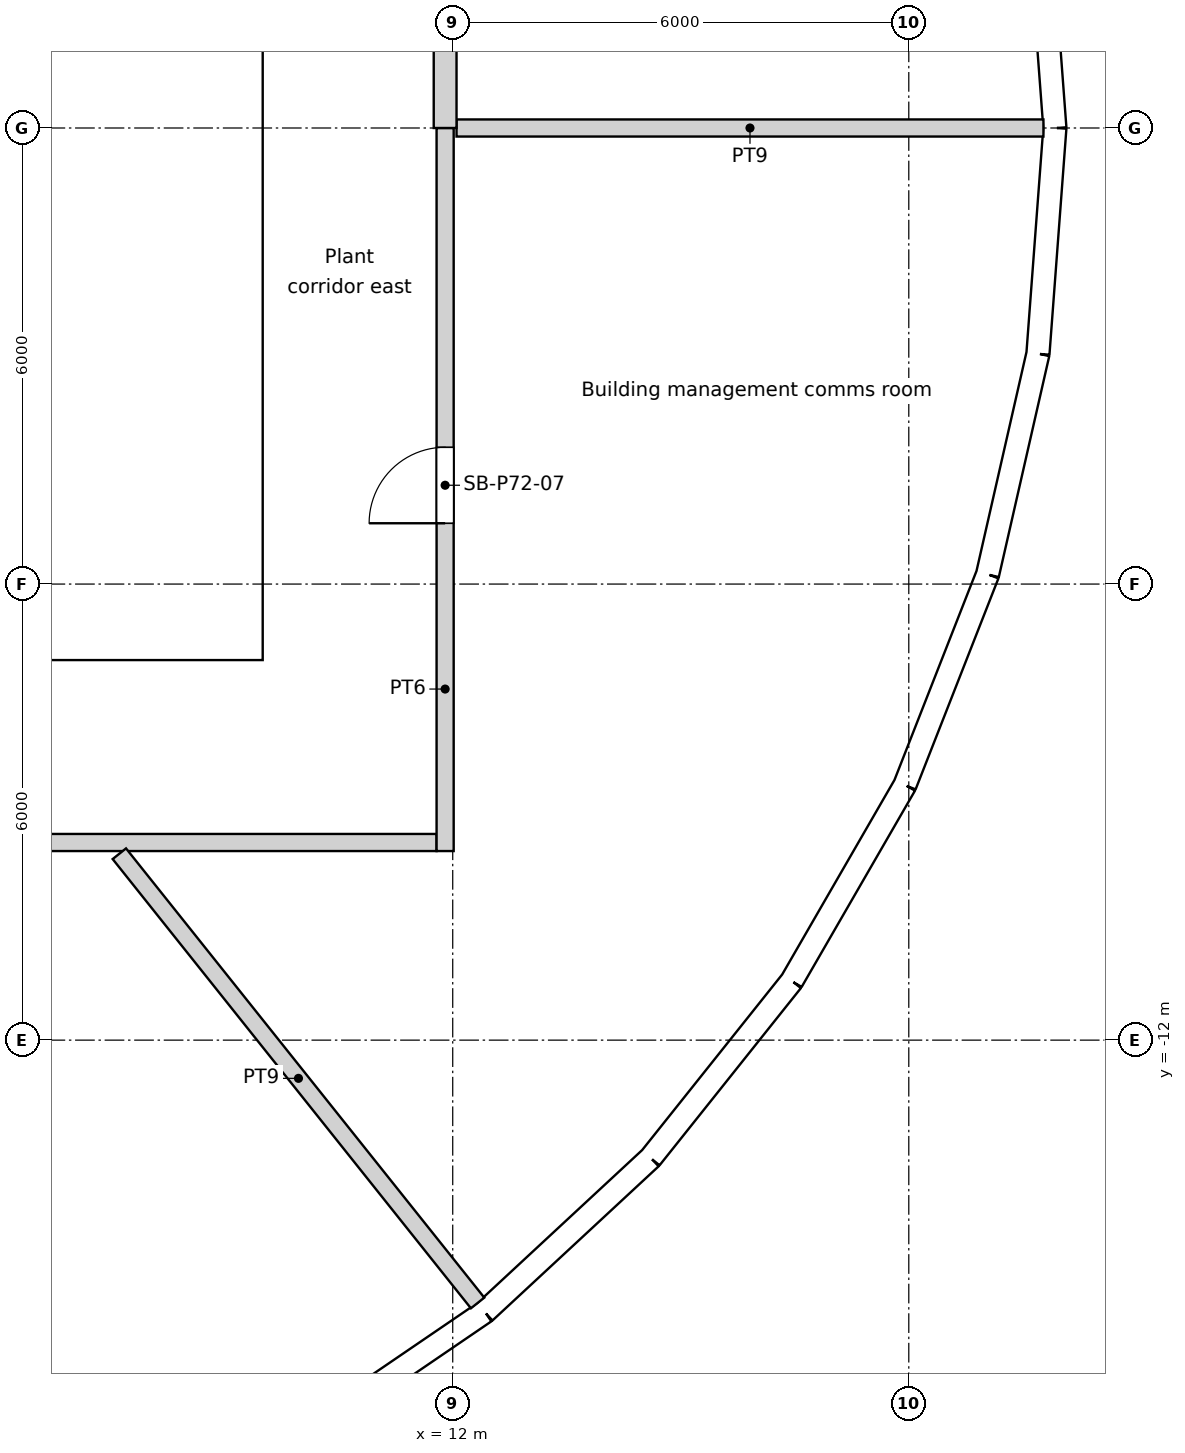
"""IFC4 building model, lengths in metres.
Left out: names, types, materials, properties, quantities, classifications, styles, units other than length and angle.
Written with IfcOpenShell. Run it as: python <this file> out.ifc"""

import sys

from ifc_helpers import new_model, si_unit, direction, frame, frame_2d, origin, origin_2d, place, context, subcontext, project, spatial, rectangle, circle, extrude, element, fill, save


model = new_model("IFC4")
c1 = context("Model", 3, precision=1e-05, world=origin(), true_north=direction((0.0, 1.0)))
c2 = subcontext(c1, "Body", "Model", "MODEL_VIEW")
j1 = project(units=[si_unit("LENGTHUNIT", "METRE"), si_unit("PLANEANGLEUNIT", "RADIAN")], contexts=[c1])
p1 = place(None, origin())
s1 = spatial("IfcSite", under=j1, at=p1, CompositionType="ELEMENT")
p2 = place(p1, origin())
s2 = spatial("IfcBuilding", under=s1, at=p2, CompositionType="ELEMENT")
p3 = place(p2, frame((0.0, 0.0, 277.8)))
s3 = spatial("IfcBuildingStorey", under=s2, at=p3, CompositionType="ELEMENT", Elevation=277.8)
for number, where, z_axis, x_axis in (
    (1, (18.822, 0.0, 0.0), (0.0, 0.0, 1.0), (1.0, 0.0, 0.0)),
    (2, (11.735, -14.716, 0.0), (0.0, 0.0, 1.0), (1.0, 0.0, 0.0)),
    (3, (15.552, -10.603, 0.0), (0.0, 0.0, 1.0), (1.0, 0.0, 0.0)),
    (4, (17.986, -5.548, 0.0), (0.0, 0.0, 1.0), (1.0, 0.0, 0.0)),
):
    element("IfcColumn", number, at=place(p3, frame(where, z_axis=z_axis, x_axis=x_axis)), inside=s3, PredefinedType="COLUMN", context=c2, shape_type="SweptSolid", body=[
        extrude(circle(Radius=0.55, at=origin_2d()), origin(), (0.0, 0.0, 1.0), 6.0),
    ])
p4 = place(p3, frame((19.922, 0.0, 0.0), z_axis=(0.0, 0.0, 1.0), x_axis=(-0.074777718064, 0.997200227076, 0.0)))
e5 = element("IfcWall", 5, at=p4, inside=s3, PredefinedType="SOLIDWALL", context=c2, shape_type="SweptSolid", body=[
    extrude(rectangle(XDim=2.978, YDim=0.3, at=frame_2d((1.489, 0.0))), origin(), (0.0, 0.0, 1.0), 5.65),
])
p5 = place(p4, frame((1.489, 0.0, 1.825)))
e6 = element("IfcOpeningElement", 6, at=p5, cuts=e5, PredefinedType="OPENING", context=c2, shape_type="SweptSolid", body=[
    extrude(circle(Radius=1.2, at=origin_2d()), frame((0.0, 0.16, 0.0), z_axis=(0.0, -1.0, 0.0), x_axis=(1.0, 0.0, 0.0)), (0.0, 0.0, 1.0), 0.32),
])
p6 = place(p3, frame((9.961, -17.253, 0.0), z_axis=(0.0, 0.0, 1.0), x_axis=(0.826253362584, 0.56329866041, 0.0)))
e7 = element("IfcWall", 7, at=p6, inside=s3, PredefinedType="SOLIDWALL", context=c2, shape_type="SweptSolid", body=[
    extrude(rectangle(XDim=2.978, YDim=0.3, at=frame_2d((1.489, 0.0))), origin(), (0.0, 0.0, 1.0), 5.65),
])
p7 = place(p6, frame((1.489, 0.0, 1.825)))
e8 = element("IfcOpeningElement", 8, at=p7, cuts=e7, PredefinedType="OPENING", context=c2, shape_type="SweptSolid", body=[
    extrude(circle(Radius=1.2, at=origin_2d()), frame((0.0, 0.16, 0.0), z_axis=(0.0, -1.0, 0.0), x_axis=(1.0, 0.0, 0.0)), (0.0, 0.0, 1.0), 0.32),
])
p8 = place(p3, frame((12.421, -15.575, 0.0), z_axis=(0.0, 0.0, 1.0), x_axis=(0.733056277766, 0.68016798927, 0.0)))
e9 = element("IfcWall", 9, at=p8, inside=s3, PredefinedType="SOLIDWALL", context=c2, shape_type="SweptSolid", body=[
    extrude(rectangle(XDim=2.978, YDim=0.3, at=frame_2d((1.489, 0.0))), origin(), (0.0, 0.0, 1.0), 5.65),
])
p9 = place(p8, frame((1.489, 0.0, 1.825)))
e10 = element("IfcOpeningElement", 10, at=p9, cuts=e9, PredefinedType="OPENING", context=c2, shape_type="SweptSolid", body=[
    extrude(circle(Radius=1.2, at=origin_2d()), frame((0.0, 0.16, 0.0), z_axis=(0.0, -1.0, 0.0), x_axis=(1.0, 0.0, 0.0)), (0.0, 0.0, 1.0), 0.32),
])
p10 = place(p3, frame((14.604, -13.55, 0.0), z_axis=(0.0, 0.0, 1.0), x_axis=(0.623494374707, 0.781827835722, 0.0)))
e11 = element("IfcWall", 11, at=p10, inside=s3, PredefinedType="SOLIDWALL", context=c2, shape_type="SweptSolid", body=[
    extrude(rectangle(XDim=2.978, YDim=0.3, at=frame_2d((1.489, 0.0))), origin(), (0.0, 0.0, 1.0), 5.2),
])
p11 = place(p10, frame((1.489, 0.0, 1.825)))
e12 = element("IfcOpeningElement", 12, at=p11, cuts=e11, PredefinedType="OPENING", context=c2, shape_type="SweptSolid", body=[
    extrude(circle(Radius=1.2, at=origin_2d()), frame((0.0, 0.16, 0.0), z_axis=(0.0, -1.0, 0.0), x_axis=(1.0, 0.0, 0.0)), (0.0, 0.0, 1.0), 0.32),
])
p12 = place(p3, frame((16.46, -11.222, 0.0), z_axis=(0.0, 0.0, 1.0), x_axis=(0.500001626982, 0.866024464444, 0.0)))
e13 = element("IfcWall", 13, at=p12, inside=s3, PredefinedType="SOLIDWALL", context=c2, shape_type="SweptSolid", body=[
    extrude(rectangle(XDim=2.978, YDim=0.3, at=frame_2d((1.489, 0.0))), origin(), (0.0, 0.0, 1.0), 5.65),
])
p13 = place(p12, frame((1.489, 0.0, 1.825)))
e14 = element("IfcOpeningElement", 14, at=p13, cuts=e13, PredefinedType="OPENING", context=c2, shape_type="SweptSolid", body=[
    extrude(circle(Radius=1.2, at=origin_2d()), frame((0.0, 0.16, 0.0), z_axis=(0.0, -1.0, 0.0), x_axis=(1.0, 0.0, 0.0)), (0.0, 0.0, 1.0), 0.32),
])
p14 = place(p3, frame((17.949, -8.644, 0.0), z_axis=(0.0, 0.0, 1.0), x_axis=(0.365289571566, 0.930893940739, 0.0)))
e15 = element("IfcWall", 15, at=p14, inside=s3, PredefinedType="SOLIDWALL", context=c2, shape_type="SweptSolid", body=[
    extrude(rectangle(XDim=2.978, YDim=0.3, at=frame_2d((1.489, 0.0))), origin(), (0.0, 0.0, 1.0), 5.65),
])
p15 = place(p14, frame((1.489, 0.0, 1.825)))
e16 = element("IfcOpeningElement", 16, at=p15, cuts=e15, PredefinedType="OPENING", context=c2, shape_type="SweptSolid", body=[
    extrude(circle(Radius=1.2, at=origin_2d()), frame((0.0, 0.16, 0.0), z_axis=(0.0, -1.0, 0.0), x_axis=(1.0, 0.0, 0.0)), (0.0, 0.0, 1.0), 0.32),
])
p16 = place(p3, frame((19.037, -5.872, 0.0), z_axis=(0.0, 0.0, 1.0), x_axis=(0.222535358937, 0.974924619662, 0.0)))
e17 = element("IfcWall", 17, at=p16, inside=s3, PredefinedType="SOLIDWALL", context=c2, shape_type="SweptSolid", body=[
    extrude(rectangle(XDim=2.978, YDim=0.3, at=frame_2d((1.489, 0.0))), origin(), (0.0, 0.0, 1.0), 5.2),
])
p17 = place(p16, frame((1.489, 0.0, 1.825)))
e18 = element("IfcOpeningElement", 18, at=p17, cuts=e17, PredefinedType="OPENING", context=c2, shape_type="SweptSolid", body=[
    extrude(circle(Radius=1.2, at=origin_2d()), frame((0.0, 0.16, 0.0), z_axis=(0.0, -1.0, 0.0), x_axis=(1.0, 0.0, 0.0)), (0.0, 0.0, 1.0), 0.32),
])
p18 = place(p3, frame((19.699, -2.969, 0.0), z_axis=(0.0, 0.0, 1.0), x_axis=(0.074777718064, 0.997200227076, 0.0)))
e19 = element("IfcWall", 19, at=p18, inside=s3, PredefinedType="SOLIDWALL", context=c2, shape_type="SweptSolid", body=[
    extrude(rectangle(XDim=2.978, YDim=0.3, at=frame_2d((1.489, 0.0))), origin(), (0.0, 0.0, 1.0), 5.65),
])
p19 = place(p18, frame((1.489, 0.0, 1.825)))
e20 = element("IfcOpeningElement", 20, at=p19, cuts=e19, PredefinedType="OPENING", context=c2, shape_type="SweptSolid", body=[
    extrude(circle(Radius=1.2, at=origin_2d()), frame((0.0, 0.16, 0.0), z_axis=(0.0, -1.0, 0.0), x_axis=(1.0, 0.0, 0.0)), (0.0, 0.0, 1.0), 0.32),
])
p20 = place(p3, frame((-9.5, -6.7, 0.0), z_axis=(0.0, 0.0, 1.0), x_axis=(1.0, 0.0, 0.0)))
e21 = element("IfcWall", 21, at=p20, inside=s3, PredefinedType="SOLIDWALL", context=c2, shape_type="SweptSolid", body=[
    extrude(rectangle(XDim=19.0, YDim=0.6, at=frame_2d((9.5, 0.0))), origin(), (0.0, 0.0, 1.0), 6.0),
])
p21 = place(p20, frame((10.4, 0.0, 0.0)))
e22 = element("IfcOpeningElement", 22, at=p21, cuts=e21, PredefinedType="OPENING", context=c2, shape_type="SweptSolid", body=[
    extrude(rectangle(XDim=1.0, YDim=2.1, at=frame_2d((0.5, 1.05))), frame((0.0, 0.3, 0.0), z_axis=(0.0, -1.0, 0.0), x_axis=(1.0, 0.0, 0.0)), (0.0, 0.0, 1.0), 0.6),
])
p22 = place(p20, frame((5.35, 0.0, 0.0)))
e23 = element("IfcOpeningElement", 23, at=p22, cuts=e21, PredefinedType="OPENING", context=c2, shape_type="SweptSolid", body=[
    extrude(rectangle(XDim=1.7, YDim=2.1, at=frame_2d((0.85, 1.05))), frame((0.0, 0.3, 0.0), z_axis=(0.0, -1.0, 0.0), x_axis=(1.0, 0.0, 0.0)), (0.0, 0.0, 1.0), 0.6),
])
p23 = place(p20, frame((11.95, 0.0, 0.0)))
e24 = element("IfcOpeningElement", 24, at=p23, cuts=e21, PredefinedType="OPENING", context=c2, shape_type="SweptSolid", body=[
    extrude(rectangle(XDim=1.7, YDim=2.1, at=frame_2d((0.85, 1.05))), frame((0.0, 0.3, 0.0), z_axis=(0.0, -1.0, 0.0), x_axis=(1.0, 0.0, 0.0)), (0.0, 0.0, 1.0), 0.6),
])
p24 = place(p3, frame((9.2, -6.4, 0.0), z_axis=(0.0, 0.0, 1.0), x_axis=(0.0, 1.0, 0.0)))
e25 = element("IfcWall", 25, at=p24, inside=s3, PredefinedType="SOLIDWALL", context=c2, shape_type="SweptSolid", body=[
    extrude(rectangle(XDim=12.8, YDim=0.6, at=frame_2d((6.4, 0.0))), origin(), (0.0, 0.0, 1.0), 6.0),
])
p25 = place(p24, frame((6.4, 0.0, 0.0)))
e26 = element("IfcOpeningElement", 26, at=p25, cuts=e25, PredefinedType="OPENING", context=c2, shape_type="SweptSolid", body=[
    extrude(rectangle(XDim=1.8, YDim=2.1, at=frame_2d((0.9, 1.05))), frame((0.0, 0.3, 0.0), z_axis=(0.0, -1.0, 0.0), x_axis=(1.0, 0.0, 0.0)), (0.0, 0.0, 1.0), 0.6),
])
p26 = place(p3, frame((2.1, -3.1, 0.0), z_axis=(0.0, 0.0, 1.0), x_axis=(1.0, 0.0, 0.0)))
e27 = element("IfcWall", 27, at=p26, inside=s3, PredefinedType="SOLIDWALL", context=c2, shape_type="SweptSolid", body=[
    extrude(rectangle(XDim=6.8, YDim=0.3, at=frame_2d((3.4, 0.0))), origin(), (0.0, 0.0, 1.0), 5.65),
])
p27 = place(p26, frame((0.35, 0.0, 0.0)))
e28 = element("IfcOpeningElement", 28, at=p27, cuts=e27, PredefinedType="OPENING", context=c2, shape_type="SweptSolid", body=[
    extrude(rectangle(XDim=1.7, YDim=2.1, at=frame_2d((0.85, 1.05))), frame((0.0, 0.15, 0.0), z_axis=(0.0, -1.0, 0.0), x_axis=(1.0, 0.0, 0.0)), (0.0, 0.0, 1.0), 0.3),
])
p28 = place(p3, frame((4.225, -1.275, 0.0), z_axis=(0.0, 0.0, 1.0), x_axis=(1.0, 0.0, 0.0)))
e29 = element("IfcWall", 29, at=p28, inside=s3, PredefinedType="SOLIDWALL", context=c2, shape_type="SweptSolid", body=[
    extrude(rectangle(XDim=4.675, YDim=0.15, at=frame_2d((2.337, 0.0))), origin(), (0.0, 0.0, 1.0), 5.65),
])
p29 = place(p28, frame((0.55, 0.0, 0.0)))
e30 = element("IfcOpeningElement", 30, at=p29, cuts=e29, PredefinedType="OPENING", context=c2, shape_type="SweptSolid", body=[
    extrude(rectangle(XDim=0.9, YDim=2.1, at=frame_2d((0.45, 1.05))), frame((0.0, 0.075, 0.0), z_axis=(0.0, -1.0, 0.0), x_axis=(1.0, 0.0, 0.0)), (0.0, 0.0, 1.0), 0.15),
])
p30 = place(p28, frame((2.188, 0.0, 0.0)))
e31 = element("IfcOpeningElement", 31, at=p30, cuts=e29, PredefinedType="OPENING", context=c2, shape_type="SweptSolid", body=[
    extrude(rectangle(XDim=0.9, YDim=2.1, at=frame_2d((0.45, 1.05))), frame((0.0, 0.075, 0.0), z_axis=(0.0, -1.0, 0.0), x_axis=(1.0, 0.0, 0.0)), (0.0, 0.0, 1.0), 0.15),
])
p31 = place(p28, frame((3.6, 0.0, 0.0)))
e32 = element("IfcOpeningElement", 32, at=p31, cuts=e29, PredefinedType="OPENING", context=c2, shape_type="SweptSolid", body=[
    extrude(rectangle(XDim=0.9, YDim=2.1, at=frame_2d((0.45, 1.05))), frame((0.0, 0.075, 0.0), z_axis=(0.0, -1.0, 0.0), x_axis=(1.0, 0.0, 0.0)), (0.0, 0.0, 1.0), 0.15),
])
p32 = place(p3, frame((7.575, -2.95, 0.0), z_axis=(0.0, 0.0, 1.0), x_axis=(0.0, 1.0, 0.0)))
e33 = element("IfcWall", 33, at=p32, inside=s3, PredefinedType="SOLIDWALL", context=c2, shape_type="SweptSolid", body=[
    extrude(rectangle(XDim=1.6, YDim=0.15, at=frame_2d((0.8, 0.0))), origin(), (0.0, 0.0, 1.0), 5.65),
])
p33 = place(p3, frame((-11.788, -9.4, 0.0), z_axis=(0.0, 0.0, 1.0), x_axis=(1.0, 0.0, 0.0)))
e34 = element("IfcWall", 34, at=p33, inside=s3, PredefinedType="PARTITIONING", context=c2, shape_type="SweptSolid", body=[
    extrude(rectangle(XDim=23.575, YDim=0.225, at=frame_2d((11.788, 0.0))), origin(), (0.0, 0.0, 1.0), 5.65),
])
p34 = place(p33, frame((6.89, 0.0, 0.0)))
e35 = element("IfcOpeningElement", 35, at=p34, cuts=e34, PredefinedType="OPENING", context=c2, shape_type="SweptSolid", body=[
    extrude(rectangle(XDim=1.0, YDim=2.1, at=frame_2d((0.5, 1.05))), frame((0.0, 0.113, 0.0), z_axis=(0.0, -1.0, 0.0), x_axis=(1.0, 0.0, 0.0)), (0.0, 0.0, 1.0), 0.225),
])
p35 = place(p33, frame((15.388, 0.0, 0.0)))
e36 = element("IfcOpeningElement", 36, at=p35, cuts=e34, PredefinedType="OPENING", context=c2, shape_type="SweptSolid", body=[
    extrude(rectangle(XDim=1.0, YDim=2.1, at=frame_2d((0.5, 1.05))), frame((0.0, 0.113, 0.0), z_axis=(0.0, -1.0, 0.0), x_axis=(1.0, 0.0, 0.0)), (0.0, 0.0, 1.0), 0.225),
])
p36 = place(p3, frame((11.9, -9.512, 0.0), z_axis=(0.0, 0.0, 1.0), x_axis=(0.0, 1.0, 0.0)))
e37 = element("IfcWall", 37, at=p36, inside=s3, PredefinedType="PARTITIONING", context=c2, shape_type="SweptSolid", body=[
    extrude(rectangle(XDim=9.512, YDim=0.225, at=frame_2d((4.756, 0.0))), origin(), (0.0, 0.0, 1.0), 5.65),
])
p37 = place(p36, frame((4.312, 0.0, 0.0)))
e38 = element("IfcOpeningElement", 38, at=p37, cuts=e37, PredefinedType="OPENING", context=c2, shape_type="SweptSolid", body=[
    extrude(rectangle(XDim=1.0, YDim=2.1, at=frame_2d((0.5, 1.05))), frame((0.0, 0.113, 0.0), z_axis=(0.0, -1.0, 0.0), x_axis=(1.0, 0.0, 0.0)), (0.0, 0.0, 1.0), 0.225),
])
p38 = place(p3, frame((11.9, 0.0, 0.0), z_axis=(0.0, 0.0, 1.0), x_axis=(0.0, 1.0, 0.0)))
e39 = element("IfcWall", 39, at=p38, inside=s3, PredefinedType="PARTITIONING", context=c2, shape_type="SweptSolid", body=[
    extrude(rectangle(XDim=9.25, YDim=0.3, at=frame_2d((4.625, 0.0))), origin(), (0.0, 0.0, 1.0), 5.65),
])
p39 = place(p38, frame((3.8, 0.0, 0.0)))
e40 = element("IfcOpeningElement", 40, at=p39, cuts=e39, PredefinedType="OPENING", context=c2, shape_type="SweptSolid", body=[
    extrude(rectangle(XDim=1.8, YDim=2.4, at=frame_2d((0.9, 1.2))), frame((0.0, 0.15, 0.0), z_axis=(0.0, -1.0, 0.0), x_axis=(1.0, 0.0, 0.0)), (0.0, 0.0, 1.0), 0.3),
])
p40 = place(p3, frame((12.327, -15.458, 0.0), z_axis=(0.0, 0.0, 1.0), x_axis=(-0.623469403717, 0.781847749008, 0.0)))
e41 = element("IfcWall", 41, at=p40, inside=s3, PredefinedType="PARTITIONING", context=c2, shape_type="SweptSolid", body=[
    extrude(rectangle(XDim=7.56, YDim=0.225, at=frame_2d((3.78, 0.0))), origin(), (0.0, 0.0, 1.0), 2.7),
])
p41 = place(p3, frame((19.771, 0.0, 0.0), z_axis=(0.0, 0.0, 1.0), x_axis=(-1.0, 0.0, 0.0)))
e42 = element("IfcWall", 42, at=p41, inside=s3, PredefinedType="PARTITIONING", context=c2, shape_type="SweptSolid", body=[
    extrude(rectangle(XDim=7.721, YDim=0.225, at=frame_2d((3.861, 0.0))), origin(), (0.0, 0.0, 1.0), 2.7),
])
p42 = place(p5, origin())
e43 = element("IfcWindow", 43, at=p42, inside=s3, PartitioningType="SINGLE_PANEL", PredefinedType="WINDOW", context=c2, shape_type="SweptSolid", body=[
    extrude(circle(Radius=1.2, at=origin_2d()), frame((0.0, 0.12, 0.0), z_axis=(0.0, -1.0, 0.0), x_axis=(1.0, 0.0, 0.0)), (0.0, 0.0, 1.0), 0.1),
])
fill(e6, e43)
p43 = place(p7, origin())
e44 = element("IfcWindow", 44, at=p43, inside=s3, PartitioningType="SINGLE_PANEL", PredefinedType="WINDOW", context=c2, shape_type="SweptSolid", body=[
    extrude(circle(Radius=1.2, at=origin_2d()), frame((0.0, 0.12, 0.0), z_axis=(0.0, -1.0, 0.0), x_axis=(1.0, 0.0, 0.0)), (0.0, 0.0, 1.0), 0.1),
])
fill(e8, e44)
p44 = place(p9, origin())
e45 = element("IfcWindow", 45, at=p44, inside=s3, PartitioningType="SINGLE_PANEL", PredefinedType="WINDOW", context=c2, shape_type="SweptSolid", body=[
    extrude(circle(Radius=1.2, at=origin_2d()), frame((0.0, 0.12, 0.0), z_axis=(0.0, -1.0, 0.0), x_axis=(1.0, 0.0, 0.0)), (0.0, 0.0, 1.0), 0.1),
])
fill(e10, e45)
p45 = place(p11, origin())
e46 = element("IfcWindow", 46, at=p45, inside=s3, PartitioningType="SINGLE_PANEL", PredefinedType="WINDOW", context=c2, shape_type="SweptSolid", body=[
    extrude(circle(Radius=1.2, at=origin_2d()), frame((0.0, 0.12, 0.0), z_axis=(0.0, -1.0, 0.0), x_axis=(1.0, 0.0, 0.0)), (0.0, 0.0, 1.0), 0.1),
])
fill(e12, e46)
p46 = place(p13, origin())
e47 = element("IfcWindow", 47, at=p46, inside=s3, PartitioningType="SINGLE_PANEL", PredefinedType="WINDOW", context=c2, shape_type="SweptSolid", body=[
    extrude(circle(Radius=1.2, at=origin_2d()), frame((0.0, 0.12, 0.0), z_axis=(0.0, -1.0, 0.0), x_axis=(1.0, 0.0, 0.0)), (0.0, 0.0, 1.0), 0.1),
])
fill(e14, e47)
p47 = place(p15, origin())
e48 = element("IfcWindow", 48, at=p47, inside=s3, PartitioningType="SINGLE_PANEL", PredefinedType="WINDOW", context=c2, shape_type="SweptSolid", body=[
    extrude(circle(Radius=1.2, at=origin_2d()), frame((0.0, 0.12, 0.0), z_axis=(0.0, -1.0, 0.0), x_axis=(1.0, 0.0, 0.0)), (0.0, 0.0, 1.0), 0.1),
])
fill(e16, e48)
p48 = place(p17, origin())
e49 = element("IfcWindow", 49, at=p48, inside=s3, PartitioningType="SINGLE_PANEL", PredefinedType="WINDOW", context=c2, shape_type="SweptSolid", body=[
    extrude(circle(Radius=1.2, at=origin_2d()), frame((0.0, 0.12, 0.0), z_axis=(0.0, -1.0, 0.0), x_axis=(1.0, 0.0, 0.0)), (0.0, 0.0, 1.0), 0.1),
])
fill(e18, e49)
p49 = place(p19, origin())
e50 = element("IfcWindow", 50, at=p49, inside=s3, PartitioningType="SINGLE_PANEL", PredefinedType="WINDOW", context=c2, shape_type="SweptSolid", body=[
    extrude(circle(Radius=1.2, at=origin_2d()), frame((0.0, 0.12, 0.0), z_axis=(0.0, -1.0, 0.0), x_axis=(1.0, 0.0, 0.0)), (0.0, 0.0, 1.0), 0.1),
])
fill(e20, e50)
p50 = place(p25, origin())
e51 = element("IfcDoor", 51, at=p50, inside=s3, OperationType="DOUBLE_DOOR_SINGLE_SWING", PredefinedType="DOOR", context=c2, shape_type="SweptSolid", body=[
    extrude(rectangle(XDim=1.8, YDim=2.1, at=frame_2d((0.9, 1.05))), frame((0.0, 0.025, 0.0), z_axis=(0.0, -1.0, 0.0), x_axis=(1.0, 0.0, 0.0)), (0.0, 0.0, 1.0), 0.05),
])
fill(e26, e51)
p51 = place(p30, origin())
e52 = element("IfcDoor", 52, at=p51, inside=s3, OperationType="SINGLE_SWING_LEFT", PredefinedType="DOOR", context=c2, shape_type="SweptSolid", body=[
    extrude(rectangle(XDim=0.9, YDim=2.1, at=frame_2d((0.45, 1.05))), frame((0.0, 0.025, 0.0), z_axis=(0.0, -1.0, 0.0), x_axis=(1.0, 0.0, 0.0)), (0.0, 0.0, 1.0), 0.05),
])
fill(e31, e52)
p52 = place(p31, origin())
e53 = element("IfcDoor", 53, at=p52, inside=s3, OperationType="SINGLE_SWING_RIGHT", PredefinedType="DOOR", context=c2, shape_type="SweptSolid", body=[
    extrude(rectangle(XDim=0.9, YDim=2.1, at=frame_2d((0.45, 1.05))), frame((0.0, 0.025, 0.0), z_axis=(0.0, -1.0, 0.0), x_axis=(1.0, 0.0, 0.0)), (0.0, 0.0, 1.0), 0.05),
])
fill(e32, e53)
p53 = place(p37, origin())
e54 = element("IfcDoor", 54, at=p53, inside=s3, OperationType="SINGLE_SWING_LEFT", PredefinedType="DOOR", context=c2, shape_type="SweptSolid", body=[
    extrude(rectangle(XDim=1.0, YDim=2.1, at=frame_2d((0.5, 1.05))), frame((0.0, 0.025, 0.0), z_axis=(0.0, -1.0, 0.0), x_axis=(1.0, 0.0, 0.0)), (0.0, 0.0, 1.0), 0.05),
])
fill(e38, e54)
save(model, sys.argv[1])
